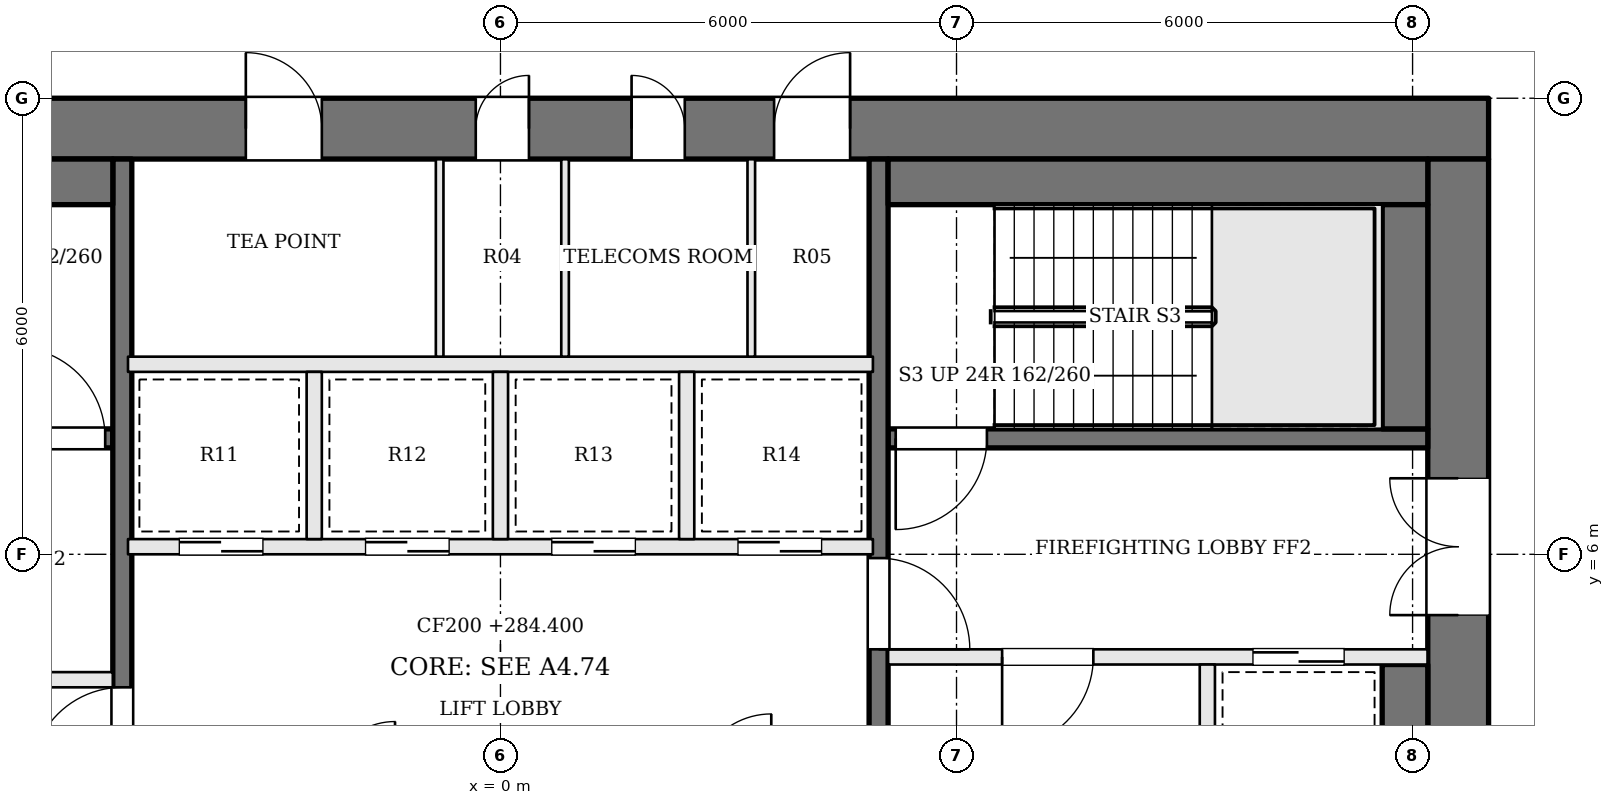
"""IFC4 building model, lengths in metres.
Left out: names, types, materials, properties, quantities, classifications, styles, units other than length and angle.
Written with IfcOpenShell. Run it as: python <this file> out.ifc"""

import sys

from ifc_helpers import new_model, si_unit, direction, frame, frame_2d, origin, place, context, subcontext, project, spatial, rectangle, extrude, element, fill, save


model = new_model("IFC4")
c1 = context("Model", 3, precision=1e-05, world=origin(), true_north=direction((0.0, 1.0)))
c2 = subcontext(c1, "Body", "Model", "MODEL_VIEW")
j1 = project(units=[si_unit("LENGTHUNIT", "METRE"), si_unit("PLANEANGLEUNIT", "RADIAN")], contexts=[c1])
p1 = place(None, origin())
s1 = spatial("IfcSite", under=j1, at=p1, CompositionType="ELEMENT")
p2 = place(p1, origin())
s2 = spatial("IfcBuilding", under=s1, at=p2, CompositionType="ELEMENT")
p3 = place(p2, frame((0.0, 0.0, 284.4)))
s3 = spatial("IfcBuildingStorey", under=s2, at=p3, CompositionType="ELEMENT", Elevation=284.4)
p4 = place(p3, frame((-13.0, 11.6, 0.0), z_axis=(0.0, 0.0, 1.0), x_axis=(1.0, 0.0, 0.0)))
e1 = element("IfcWall", 1, at=p4, inside=s3, PredefinedType="SHEAR", context=c2, shape_type="SweptSolid", body=[
    extrude(rectangle(XDim=26.0, YDim=0.8, at=frame_2d((13.0, 0.0))), origin(), (0.0, 0.0, 1.0), 3.9),
])
p5 = place(p4, frame((9.65, 0.0, 0.0)))
e2 = element("IfcOpeningElement", 2, at=p5, cuts=e1, PredefinedType="OPENING", context=c2, shape_type="SweptSolid", body=[
    extrude(rectangle(XDim=1.0, YDim=2.1, at=frame_2d((0.5, 1.05))), frame((0.0, 0.41, 0.0), z_axis=(0.0, -1.0, 0.0), x_axis=(1.0, 0.0, 0.0)), (0.0, 0.0, 1.0), 0.82),
])
p6 = place(p4, frame((12.675, 0.0, 0.0)))
e3 = element("IfcOpeningElement", 3, at=p6, cuts=e1, PredefinedType="OPENING", context=c2, shape_type="SweptSolid", body=[
    extrude(rectangle(XDim=0.7, YDim=2.1, at=frame_2d((0.35, 1.05))), frame((0.0, 0.41, 0.0), z_axis=(0.0, -1.0, 0.0), x_axis=(1.0, 0.0, 0.0)), (0.0, 0.0, 1.0), 0.82),
])
p7 = place(p4, frame((14.725, 0.0, 0.0)))
e4 = element("IfcOpeningElement", 4, at=p7, cuts=e1, PredefinedType="OPENING", context=c2, shape_type="SweptSolid", body=[
    extrude(rectangle(XDim=0.7, YDim=2.1, at=frame_2d((0.35, 1.05))), frame((0.0, 0.41, 0.0), z_axis=(0.0, -1.0, 0.0), x_axis=(1.0, 0.0, 0.0)), (0.0, 0.0, 1.0), 0.82),
])
p8 = place(p4, frame((16.6, 0.0, 0.0)))
e5 = element("IfcOpeningElement", 5, at=p8, cuts=e1, PredefinedType="OPENING", context=c2, shape_type="SweptSolid", body=[
    extrude(rectangle(XDim=1.0, YDim=2.1, at=frame_2d((0.5, 1.05))), frame((0.0, 0.41, 0.0), z_axis=(0.0, -1.0, 0.0), x_axis=(1.0, 0.0, 0.0)), (0.0, 0.0, 1.0), 0.82),
])
p9 = place(p3, frame((12.6, -2.2, 0.0), z_axis=(0.0, 0.0, 1.0), x_axis=(0.0, 1.0, 0.0)))
e6 = element("IfcWall", 6, at=p9, inside=s3, PredefinedType="SHEAR", context=c2, shape_type="SweptSolid", body=[
    extrude(rectangle(XDim=13.4, YDim=0.8, at=frame_2d((6.7, 0.0))), origin(), (0.0, 0.0, 1.0), 3.9),
])
p10 = place(p9, frame((7.4, 0.0, 0.0)))
e7 = element("IfcOpeningElement", 7, at=p10, cuts=e6, PredefinedType="OPENING", context=c2, shape_type="SweptSolid", body=[
    extrude(rectangle(XDim=1.8, YDim=2.1, at=frame_2d((0.9, 1.05))), frame((0.0, 0.41, 0.0), z_axis=(0.0, -1.0, 0.0), x_axis=(1.0, 0.0, 0.0)), (0.0, 0.0, 1.0), 0.82),
])
p11 = place(p3, frame((12.2, 7.525, 0.0), z_axis=(0.0, 0.0, 1.0), x_axis=(-1.0, 0.0, 0.0)))
e8 = element("IfcWall", 8, at=p11, inside=s3, PredefinedType="SOLIDWALL", context=c2, shape_type="SweptSolid", body=[
    extrude(rectangle(XDim=7.1, YDim=0.25, at=frame_2d((3.55, 0.0))), origin(), (0.0, 0.0, 1.0), 3.7),
])
p12 = place(p11, frame((5.8, 0.0, 0.0)))
e9 = element("IfcOpeningElement", 9, at=p12, cuts=e8, PredefinedType="OPENING", context=c2, shape_type="SweptSolid", body=[
    extrude(rectangle(XDim=1.2, YDim=2.1, at=frame_2d((0.6, 1.05))), frame((0.0, 0.135, 0.0), z_axis=(0.0, -1.0, 0.0), x_axis=(1.0, 0.0, 0.0)), (0.0, 0.0, 1.0), 0.27),
])
p13 = place(p3, frame((-12.2, 4.35, 0.0), z_axis=(0.0, 0.0, 1.0), x_axis=(1.0, 0.0, 0.0)))
e10 = element("IfcWall", 10, at=p13, inside=s3, PredefinedType="SOLIDWALL", context=c2, shape_type="SweptSolid", body=[
    extrude(rectangle(XDim=7.1, YDim=0.2, at=frame_2d((3.55, 0.0))), origin(), (0.0, 0.0, 1.0), 3.7),
])
p14 = place(p13, frame((4.4, 0.0, 0.0)))
e11 = element("IfcOpeningElement", 11, at=p14, cuts=e10, PredefinedType="OPENING", context=c2, shape_type="SweptSolid", body=[
    extrude(rectangle(XDim=1.2, YDim=2.1, at=frame_2d((0.6, 1.05))), frame((0.0, 0.11, 0.0), z_axis=(0.0, -1.0, 0.0), x_axis=(1.0, 0.0, 0.0)), (0.0, 0.0, 1.0), 0.22),
])
p15 = place(p13, frame((1.1, 0.0, 0.0)))
e12 = element("IfcOpeningElement", 12, at=p15, cuts=e10, PredefinedType="OPENING", context=c2, shape_type="SweptSolid", body=[
    extrude(rectangle(XDim=1.2, YDim=2.1, at=frame_2d((0.6, 1.05))), frame((0.0, 0.11, 0.0), z_axis=(0.0, -1.0, 0.0), x_axis=(1.0, 0.0, 0.0)), (0.0, 0.0, 1.0), 0.22),
])
p16 = place(p3, frame((12.2, 4.65, 0.0), z_axis=(0.0, 0.0, 1.0), x_axis=(-1.0, 0.0, 0.0)))
e13 = element("IfcWall", 13, at=p16, inside=s3, PredefinedType="SOLIDWALL", context=c2, shape_type="SweptSolid", body=[
    extrude(rectangle(XDim=7.1, YDim=0.2, at=frame_2d((3.55, 0.0))), origin(), (0.0, 0.0, 1.0), 3.7),
])
p17 = place(p16, frame((4.4, 0.0, 0.0)))
e14 = element("IfcOpeningElement", 14, at=p17, cuts=e13, PredefinedType="OPENING", context=c2, shape_type="SweptSolid", body=[
    extrude(rectangle(XDim=1.2, YDim=2.1, at=frame_2d((0.6, 1.05))), frame((0.0, 0.11, 0.0), z_axis=(0.0, -1.0, 0.0), x_axis=(1.0, 0.0, 0.0)), (0.0, 0.0, 1.0), 0.22),
])
p18 = place(p16, frame((1.1, 0.0, 0.0)))
e15 = element("IfcOpeningElement", 15, at=p18, cuts=e13, PredefinedType="OPENING", context=c2, shape_type="SweptSolid", body=[
    extrude(rectangle(XDim=1.2, YDim=2.1, at=frame_2d((0.6, 1.05))), frame((0.0, 0.11, 0.0), z_axis=(0.0, -1.0, 0.0), x_axis=(1.0, 0.0, 0.0)), (0.0, 0.0, 1.0), 0.22),
])
p19 = place(p3, frame((-12.2, 7.525, 0.0), z_axis=(0.0, 0.0, 1.0), x_axis=(1.0, 0.0, 0.0)))
e16 = element("IfcWall", 16, at=p19, inside=s3, PredefinedType="SOLIDWALL", context=c2, shape_type="SweptSolid", body=[
    extrude(rectangle(XDim=7.1, YDim=0.25, at=frame_2d((3.55, 0.0))), origin(), (0.0, 0.0, 1.0), 3.7),
])
p20 = place(p19, frame((5.8, 0.0, 0.0)))
e17 = element("IfcOpeningElement", 17, at=p20, cuts=e16, PredefinedType="OPENING", context=c2, shape_type="SweptSolid", body=[
    extrude(rectangle(XDim=1.2, YDim=2.1, at=frame_2d((0.6, 1.05))), frame((0.0, 0.135, 0.0), z_axis=(0.0, -1.0, 0.0), x_axis=(1.0, 0.0, 0.0)), (0.0, 0.0, 1.0), 0.27),
])
p21 = place(p3, frame((9.3, 4.55, 0.0), z_axis=(0.0, 0.0, 1.0), x_axis=(0.0, -1.0, 0.0)))
e18 = element("IfcWall", 18, at=p21, inside=s3, PredefinedType="SOLIDWALL", context=c2, shape_type="SweptSolid", body=[
    extrude(rectangle(XDim=3.0, YDim=0.2, at=frame_2d((1.5, 0.0))), origin(), (0.0, 0.0, 1.0), 3.7),
])
p22 = place(p3, frame((-4.975, -2.2, 0.0), z_axis=(0.0, 0.0, 1.0), x_axis=(0.0, 1.0, 0.0)))
e19 = element("IfcWall", 19, at=p22, inside=s3, PredefinedType="SOLIDWALL", context=c2, shape_type="SweptSolid", body=[
    extrude(rectangle(XDim=13.4, YDim=0.25, at=frame_2d((6.7, 0.0))), origin(), (0.0, 0.0, 1.0), 3.7),
])
p23 = place(p22, frame((5.25, 0.0, 0.0)))
e20 = element("IfcOpeningElement", 20, at=p23, cuts=e19, PredefinedType="OPENING", context=c2, shape_type="SweptSolid", body=[
    extrude(rectangle(XDim=1.2, YDim=2.1, at=frame_2d((0.6, 1.05))), frame((0.0, 0.135, 0.0), z_axis=(0.0, -1.0, 0.0), x_axis=(1.0, 0.0, 0.0)), (0.0, 0.0, 1.0), 0.27),
])
p24 = place(p3, frame((4.975, 11.2, 0.0), z_axis=(0.0, 0.0, 1.0), x_axis=(0.0, -1.0, 0.0)))
e21 = element("IfcWall", 21, at=p24, inside=s3, PredefinedType="SOLIDWALL", context=c2, shape_type="SweptSolid", body=[
    extrude(rectangle(XDim=13.4, YDim=0.25, at=frame_2d((6.7, 0.0))), origin(), (0.0, 0.0, 1.0), 3.7),
])
p25 = place(p24, frame((5.25, 0.0, 0.0)))
e22 = element("IfcOpeningElement", 22, at=p25, cuts=e21, PredefinedType="OPENING", context=c2, shape_type="SweptSolid", body=[
    extrude(rectangle(XDim=1.2, YDim=2.1, at=frame_2d((0.6, 1.05))), frame((0.0, 0.135, 0.0), z_axis=(0.0, -1.0, 0.0), x_axis=(1.0, 0.0, 0.0)), (0.0, 0.0, 1.0), 0.27),
])
for number, where, z_axis, x_axis in (
    (23, (-12.2, 10.9, 0.0), (0.0, 0.0, 1.0), (1.0, 0.0, 0.0)),
    (24, (12.2, 10.9, 0.0), (0.0, 0.0, 1.0), (-1.0, 0.0, 0.0)),
):
    element("IfcWall", number, at=place(p3, frame(where, z_axis=z_axis, x_axis=x_axis)), inside=s3, PredefinedType="SOLIDWALL", context=c2, shape_type="SweptSolid", body=[
        extrude(rectangle(XDim=7.1, YDim=0.6, at=frame_2d((3.55, 0.0))), origin(), (0.0, 0.0, 1.0), 3.7),
    ])
p26 = place(p3, frame((11.9, 10.6, 0.0), z_axis=(0.0, 0.0, 1.0), x_axis=(0.0, -1.0, 0.0)))
e25 = element("IfcWall", 25, at=p26, inside=s3, PredefinedType="SOLIDWALL", context=c2, shape_type="SweptSolid", body=[
    extrude(rectangle(XDim=2.95, YDim=0.6, at=frame_2d((1.475, 0.0))), origin(), (0.0, 0.0, 1.0), 3.7),
])
p27 = place(p3, frame((11.9, 4.55, 0.0), z_axis=(0.0, 0.0, 1.0), x_axis=(0.0, -1.0, 0.0)))
e26 = element("IfcWall", 26, at=p27, inside=s3, PredefinedType="SOLIDWALL", context=c2, shape_type="SweptSolid", body=[
    extrude(rectangle(XDim=3.0, YDim=0.6, at=frame_2d((1.5, 0.0))), origin(), (0.0, 0.0, 1.0), 3.7),
])
p28 = place(p3, frame((-4.9, 6.1, 0.0), z_axis=(0.0, 0.0, 1.0), x_axis=(1.0, 0.0, 0.0)))
e27 = element("IfcWall", 27, at=p28, inside=s3, PredefinedType="SOLIDWALL", context=c2, shape_type="SweptSolid", body=[
    extrude(rectangle(XDim=9.8, YDim=0.2, at=frame_2d((4.9, 0.0))), origin(), (0.0, 0.0, 1.0), 3.7),
])
p29 = place(p28, frame((0.675, 0.0, 0.0)))
e28 = element("IfcOpeningElement", 28, at=p29, cuts=e27, PredefinedType="OPENING", context=c2, shape_type="SweptSolid", body=[
    extrude(rectangle(XDim=1.1, YDim=2.1, at=frame_2d((0.55, 1.05))), frame((0.0, 0.11, 0.0), z_axis=(0.0, -1.0, 0.0), x_axis=(1.0, 0.0, 0.0)), (0.0, 0.0, 1.0), 0.22),
])
p30 = place(p28, frame((3.125, 0.0, 0.0)))
e29 = element("IfcOpeningElement", 29, at=p30, cuts=e27, PredefinedType="OPENING", context=c2, shape_type="SweptSolid", body=[
    extrude(rectangle(XDim=1.1, YDim=2.1, at=frame_2d((0.55, 1.05))), frame((0.0, 0.11, 0.0), z_axis=(0.0, -1.0, 0.0), x_axis=(1.0, 0.0, 0.0)), (0.0, 0.0, 1.0), 0.22),
])
p31 = place(p28, frame((5.575, 0.0, 0.0)))
e30 = element("IfcOpeningElement", 30, at=p31, cuts=e27, PredefinedType="OPENING", context=c2, shape_type="SweptSolid", body=[
    extrude(rectangle(XDim=1.1, YDim=2.1, at=frame_2d((0.55, 1.05))), frame((0.0, 0.11, 0.0), z_axis=(0.0, -1.0, 0.0), x_axis=(1.0, 0.0, 0.0)), (0.0, 0.0, 1.0), 0.22),
])
p32 = place(p28, frame((8.025, 0.0, 0.0)))
e31 = element("IfcOpeningElement", 31, at=p32, cuts=e27, PredefinedType="OPENING", context=c2, shape_type="SweptSolid", body=[
    extrude(rectangle(XDim=1.1, YDim=2.1, at=frame_2d((0.55, 1.05))), frame((0.0, 0.11, 0.0), z_axis=(0.0, -1.0, 0.0), x_axis=(1.0, 0.0, 0.0)), (0.0, 0.0, 1.0), 0.22),
])
p33 = place(p3, frame((-4.9, 8.5, 0.0), z_axis=(0.0, 0.0, 1.0), x_axis=(1.0, 0.0, 0.0)))
e32 = element("IfcWall", 32, at=p33, inside=s3, PredefinedType="SOLIDWALL", context=c2, shape_type="SweptSolid", body=[
    extrude(rectangle(XDim=9.8, YDim=0.2, at=frame_2d((4.9, 0.0))), origin(), (0.0, 0.0, 1.0), 3.7),
])
for number, where, z_axis, x_axis in (
    (33, (-2.45, 6.2, 0.0), (0.0, 0.0, 1.0), (0.0, 1.0, 0.0)),
    (34, (0.0, 6.2, 0.0), (0.0, 0.0, 1.0), (0.0, 1.0, 0.0)),
    (35, (2.45, 6.2, 0.0), (0.0, 0.0, 1.0), (0.0, 1.0, 0.0)),
):
    element("IfcWall", number, at=place(p3, frame(where, z_axis=z_axis, x_axis=x_axis)), inside=s3, PredefinedType="SOLIDWALL", context=c2, shape_type="SweptSolid", body=[
        extrude(rectangle(XDim=2.2, YDim=0.2, at=frame_2d((1.1, 0.0))), origin(), (0.0, 0.0, 1.0), 3.7),
    ])
for number, where, z_axis, x_axis in (
    (36, (-0.8, 8.6, 0.0), (0.0, 0.0, 1.0), (0.0, 1.0, 0.0)),
    (37, (0.85, 8.6, 0.0), (0.0, 0.0, 1.0), (0.0, 1.0, 0.0)),
    (38, (3.3, 8.6, 0.0), (0.0, 0.0, 1.0), (0.0, 1.0, 0.0)),
):
    element("IfcWall", number, at=place(p3, frame(where, z_axis=z_axis, x_axis=x_axis)), inside=s3, PredefinedType="PARTITIONING", context=c2, shape_type="SweptSolid", body=[
        extrude(rectangle(XDim=2.6, YDim=0.1, at=frame_2d((1.3, 0.0))), origin(), (0.0, 0.0, 1.0), 3.7),
    ])
p34 = place(p10, origin())
e39 = element("IfcDoor", 39, at=p34, inside=s3, OperationType="DOUBLE_DOOR_SINGLE_SWING", PredefinedType="DOOR", context=c2, shape_type="SweptSolid", body=[
    extrude(rectangle(XDim=1.8, YDim=2.1, at=frame_2d((0.9, 1.05))), frame((0.0, 0.025, 0.0), z_axis=(0.0, -1.0, 0.0), x_axis=(1.0, 0.0, 0.0)), (0.0, 0.0, 1.0), 0.05),
])
fill(e7, e39)
p35 = place(p23, origin())
e40 = element("IfcDoor", 40, at=p35, inside=s3, OperationType="SINGLE_SWING_LEFT", PredefinedType="DOOR", context=c2, shape_type="SweptSolid", body=[
    extrude(rectangle(XDim=1.2, YDim=2.1, at=frame_2d((0.6, 1.05))), frame((0.0, 0.025, 0.0), z_axis=(0.0, -1.0, 0.0), x_axis=(1.0, 0.0, 0.0)), (0.0, 0.0, 1.0), 0.05),
])
fill(e20, e40)
p36 = place(p25, origin())
e41 = element("IfcDoor", 41, at=p36, inside=s3, OperationType="SINGLE_SWING_RIGHT", PredefinedType="DOOR", context=c2, shape_type="SweptSolid", body=[
    extrude(rectangle(XDim=1.2, YDim=2.1, at=frame_2d((0.6, 1.05))), frame((0.0, 0.025, 0.0), z_axis=(0.0, -1.0, 0.0), x_axis=(1.0, 0.0, 0.0)), (0.0, 0.0, 1.0), 0.05),
])
fill(e22, e41)
p37 = place(p17, origin())
e42 = element("IfcDoor", 42, at=p37, inside=s3, OperationType="SINGLE_SWING_RIGHT", PredefinedType="DOOR", context=c2, shape_type="SweptSolid", body=[
    extrude(rectangle(XDim=1.2, YDim=2.1, at=frame_2d((0.6, 1.05))), frame((0.0, 0.025, 0.0), z_axis=(0.0, -1.0, 0.0), x_axis=(1.0, 0.0, 0.0)), (0.0, 0.0, 1.0), 0.05),
])
fill(e14, e42)
p38 = place(p12, origin())
e43 = element("IfcDoor", 43, at=p38, inside=s3, OperationType="SINGLE_SWING_RIGHT", PredefinedType="DOOR", context=c2, shape_type="SweptSolid", body=[
    extrude(rectangle(XDim=1.2, YDim=2.1, at=frame_2d((0.6, 1.05))), frame((0.0, 0.025, 0.0), z_axis=(0.0, -1.0, 0.0), x_axis=(1.0, 0.0, 0.0)), (0.0, 0.0, 1.0), 0.05),
])
fill(e9, e43)
p39 = place(p20, origin())
e44 = element("IfcDoor", 44, at=p39, inside=s3, OperationType="SINGLE_SWING_LEFT", PredefinedType="DOOR", context=c2, shape_type="SweptSolid", body=[
    extrude(rectangle(XDim=1.2, YDim=2.1, at=frame_2d((0.6, 1.05))), frame((0.0, 0.025, 0.0), z_axis=(0.0, -1.0, 0.0), x_axis=(1.0, 0.0, 0.0)), (0.0, 0.0, 1.0), 0.05),
])
fill(e17, e44)
p40 = place(p18, origin())
e45 = element("IfcDoor", 45, at=p40, inside=s3, OperationType="SLIDING_TO_RIGHT", PredefinedType="DOOR", context=c2, shape_type="SweptSolid", body=[
    extrude(rectangle(XDim=1.2, YDim=2.1, at=frame_2d((0.6, 1.05))), frame((0.0, 0.025, 0.0), z_axis=(0.0, -1.0, 0.0), x_axis=(1.0, 0.0, 0.0)), (0.0, 0.0, 1.0), 0.05),
])
fill(e15, e45)
p41 = place(p29, origin())
e46 = element("IfcDoor", 46, at=p41, inside=s3, OperationType="SLIDING_TO_RIGHT", PredefinedType="DOOR", context=c2, shape_type="SweptSolid", body=[
    extrude(rectangle(XDim=1.1, YDim=2.1, at=frame_2d((0.55, 1.05))), frame((0.0, 0.025, 0.0), z_axis=(0.0, -1.0, 0.0), x_axis=(1.0, 0.0, 0.0)), (0.0, 0.0, 1.0), 0.05),
])
fill(e28, e46)
p42 = place(p30, origin())
e47 = element("IfcDoor", 47, at=p42, inside=s3, OperationType="SLIDING_TO_LEFT", PredefinedType="DOOR", context=c2, shape_type="SweptSolid", body=[
    extrude(rectangle(XDim=1.1, YDim=2.1, at=frame_2d((0.55, 1.05))), frame((0.0, 0.025, 0.0), z_axis=(0.0, -1.0, 0.0), x_axis=(1.0, 0.0, 0.0)), (0.0, 0.0, 1.0), 0.05),
])
fill(e29, e47)
p43 = place(p31, origin())
e48 = element("IfcDoor", 48, at=p43, inside=s3, OperationType="SLIDING_TO_RIGHT", PredefinedType="DOOR", context=c2, shape_type="SweptSolid", body=[
    extrude(rectangle(XDim=1.1, YDim=2.1, at=frame_2d((0.55, 1.05))), frame((0.0, 0.025, 0.0), z_axis=(0.0, -1.0, 0.0), x_axis=(1.0, 0.0, 0.0)), (0.0, 0.0, 1.0), 0.05),
])
fill(e30, e48)
p44 = place(p32, origin())
e49 = element("IfcDoor", 49, at=p44, inside=s3, OperationType="SLIDING_TO_LEFT", PredefinedType="DOOR", context=c2, shape_type="SweptSolid", body=[
    extrude(rectangle(XDim=1.1, YDim=2.1, at=frame_2d((0.55, 1.05))), frame((0.0, 0.025, 0.0), z_axis=(0.0, -1.0, 0.0), x_axis=(1.0, 0.0, 0.0)), (0.0, 0.0, 1.0), 0.05),
])
fill(e31, e49)
p45 = place(p5, origin())
e50 = element("IfcDoor", 50, at=p45, inside=s3, OperationType="SINGLE_SWING_LEFT", PredefinedType="DOOR", context=c2, shape_type="SweptSolid", body=[
    extrude(rectangle(XDim=1.0, YDim=2.1, at=frame_2d((0.5, 1.05))), frame((0.0, 0.025, 0.0), z_axis=(0.0, -1.0, 0.0), x_axis=(1.0, 0.0, 0.0)), (0.0, 0.0, 1.0), 0.05),
])
fill(e2, e50)
p46 = place(p6, origin())
e51 = element("IfcDoor", 51, at=p46, inside=s3, OperationType="SINGLE_SWING_RIGHT", PredefinedType="DOOR", context=c2, shape_type="SweptSolid", body=[
    extrude(rectangle(XDim=0.7, YDim=2.1, at=frame_2d((0.35, 1.05))), frame((0.0, 0.025, 0.0), z_axis=(0.0, -1.0, 0.0), x_axis=(1.0, 0.0, 0.0)), (0.0, 0.0, 1.0), 0.05),
])
fill(e3, e51)
p47 = place(p7, origin())
e52 = element("IfcDoor", 52, at=p47, inside=s3, OperationType="SINGLE_SWING_LEFT", PredefinedType="DOOR", context=c2, shape_type="SweptSolid", body=[
    extrude(rectangle(XDim=0.7, YDim=2.1, at=frame_2d((0.35, 1.05))), frame((0.0, 0.025, 0.0), z_axis=(0.0, -1.0, 0.0), x_axis=(1.0, 0.0, 0.0)), (0.0, 0.0, 1.0), 0.05),
])
fill(e4, e52)
p48 = place(p8, origin())
e53 = element("IfcDoor", 53, at=p48, inside=s3, OperationType="SINGLE_SWING_RIGHT", PredefinedType="DOOR", context=c2, shape_type="SweptSolid", body=[
    extrude(rectangle(XDim=1.0, YDim=2.1, at=frame_2d((0.5, 1.05))), frame((0.0, 0.025, 0.0), z_axis=(0.0, -1.0, 0.0), x_axis=(1.0, 0.0, 0.0)), (0.0, 0.0, 1.0), 0.05),
])
fill(e5, e53)
save(model, sys.argv[1])
